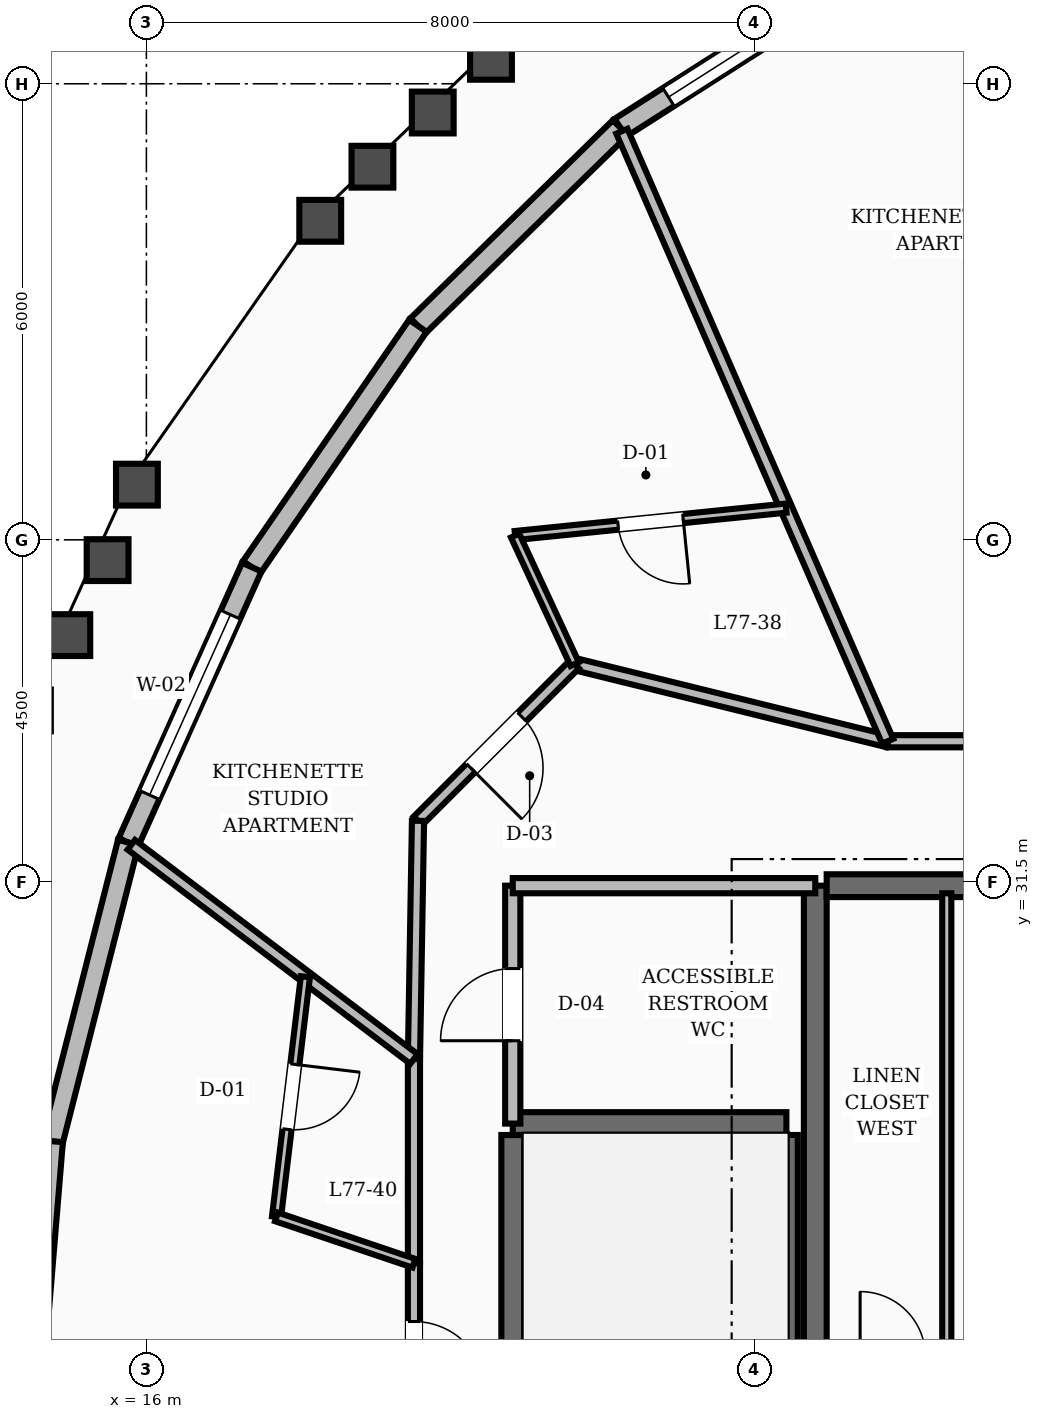
"""IFC4 building model, lengths in metres.
Left out: names, types, materials, properties, quantities, classifications, styles, units other than length and angle.
Written with IfcOpenShell. Run it as: python <this file> out.ifc"""

import sys

from ifc_helpers import new_model, si_unit, direction, frame, frame_2d, origin, place, context, subcontext, project, spatial, rectangle, extrude, element, fill, save


model = new_model("IFC4")
c1 = context("Model", 3, precision=1e-05, world=origin(), true_north=direction((0.0, 1.0)))
c2 = subcontext(c1, "Body", "Model", "MODEL_VIEW")
j1 = project(units=[si_unit("LENGTHUNIT", "METRE"), si_unit("PLANEANGLEUNIT", "RADIAN")], contexts=[c1])
p1 = place(None, origin())
s1 = spatial("IfcSite", under=j1, at=p1, CompositionType="ELEMENT")
p2 = place(p1, origin())
s2 = spatial("IfcBuilding", under=s1, at=p2, CompositionType="ELEMENT")
p3 = place(p2, frame((0.0, 0.0, 294.0)))
s3 = spatial("IfcBuildingStorey", under=s2, at=p3, CompositionType="ELEMENT", Elevation=294.0)
p4 = place(p3, frame((24.8, 25.15, 0.0), z_axis=(0.0, 0.0, 1.0), x_axis=(0.0, 1.0, 0.0)))
e1 = element("IfcWall", 1, at=p4, inside=s3, PredefinedType="SHEAR", context=c2, shape_type="SweptSolid", body=[
    extrude(rectangle(XDim=6.3, YDim=0.3, at=frame_2d((3.15, 0.0))), origin(), (0.0, 0.0, 1.0), 3.6),
])
p5 = place(p3, frame((24.95, 31.45, 0.0), z_axis=(0.0, 0.0, 1.0), x_axis=(1.0, 0.0, 0.0)))
e2 = element("IfcWall", 2, at=p5, inside=s3, PredefinedType="SHEAR", context=c2, shape_type="SweptSolid", body=[
    extrude(rectangle(XDim=3.25, YDim=0.3, at=frame_2d((1.625, 0.0))), origin(), (0.0, 0.0, 1.0), 3.6),
])
for number, where, z_axis, x_axis in (
    (3, (20.82, 19.43, 0.0), (0.0, 0.0, 1.0), (0.0, 1.0, 0.0)),
    (4, (24.42, 19.43, 0.0), (0.0, 0.0, 1.0), (0.0, 1.0, 0.0)),
):
    element("IfcWall", number, at=place(p3, frame(where, z_axis=z_axis, x_axis=x_axis)), inside=s3, PredefinedType="SHEAR", context=c2, shape_type="SweptSolid", body=[
        extrude(rectangle(XDim=8.74, YDim=0.3, at=frame_2d((4.37, 0.0))), origin(), (0.0, 0.0, 1.0), 3.6),
    ])
p6 = place(p3, frame((20.82, 28.32, 0.0), z_axis=(0.0, 0.0, 1.0), x_axis=(1.0, 0.0, 0.0)))
e5 = element("IfcWall", 5, at=p6, inside=s3, PredefinedType="SHEAR", context=c2, shape_type="SweptSolid", body=[
    extrude(rectangle(XDim=3.6, YDim=0.3, at=frame_2d((1.8, 0.0))), origin(), (0.0, 0.0, 1.0), 3.6),
])
p7 = place(p3, frame((25.274, 43.357, 0.0), z_axis=(0.0, 0.0, 1.0), x_axis=(-0.843329306989, -0.537397134319, 0.0)))
e6 = element("IfcWall", 6, at=p7, inside=s3, PredefinedType="STANDARD", context=c2, shape_type="SweptSolid", body=[
    extrude(rectangle(XDim=3.603, YDim=0.28, at=frame_2d((1.802, 0.0))), origin(), (0.0, 0.0, 1.0), 2.82),
])
p8 = place(p7, frame((0.752, 0.0, 0.8)))
e7 = element("IfcOpeningElement", 7, at=p8, cuts=e6, PredefinedType="OPENING", context=c2, shape_type="SweptSolid", body=[
    extrude(rectangle(XDim=2.1, YDim=1.65, at=frame_2d((1.05, 0.825))), frame((0.0, 0.15, 0.0), z_axis=(0.0, -1.0, 0.0), x_axis=(1.0, 0.0, 0.0)), (0.0, 0.0, 1.0), 0.3),
])
p9 = place(p3, frame((22.235, 41.421, 0.0), z_axis=(0.0, 0.0, 1.0), x_axis=(-0.714829041056, -0.699299250724, 0.0)))
e8 = element("IfcWall", 8, at=p9, inside=s3, PredefinedType="STANDARD", context=c2, shape_type="SweptSolid", body=[
    extrude(rectangle(XDim=3.726, YDim=0.28, at=frame_2d((1.863, 0.0))), origin(), (0.0, 0.0, 1.0), 2.82),
])
p10 = place(p3, frame((19.572, 38.815, 0.0), z_axis=(0.0, 0.0, 1.0), x_axis=(-0.567090463347, -0.823655514388, 0.0)))
e9 = element("IfcWall", 9, at=p10, inside=s3, PredefinedType="STANDARD", context=c2, shape_type="SweptSolid", body=[
    extrude(rectangle(XDim=3.855, YDim=0.28, at=frame_2d((1.927, 0.0))), origin(), (0.0, 0.0, 1.0), 2.82),
])
p11 = place(p3, frame((17.386, 35.64, 0.0), z_axis=(0.0, 0.0, 1.0), x_axis=(-0.409103581908, -0.912487950205, 0.0)))
e10 = element("IfcWall", 10, at=p11, inside=s3, PredefinedType="STANDARD", context=c2, shape_type="SweptSolid", body=[
    extrude(rectangle(XDim=3.97, YDim=0.28, at=frame_2d((1.985, 0.0))), origin(), (0.0, 0.0, 1.0), 2.82),
])
p12 = place(p11, frame((0.685, 0.0, 0.8)))
e11 = element("IfcOpeningElement", 11, at=p12, cuts=e10, PredefinedType="OPENING", context=c2, shape_type="SweptSolid", body=[
    extrude(rectangle(XDim=2.6, YDim=1.65, at=frame_2d((1.3, 0.825))), frame((0.0, 0.15, 0.0), z_axis=(0.0, -1.0, 0.0), x_axis=(1.0, 0.0, 0.0)), (0.0, 0.0, 1.0), 0.3),
])
p13 = place(p3, frame((15.762, 32.018, 0.0), z_axis=(0.0, 0.0, 1.0), x_axis=(-0.246626857917, -0.969110516378, 0.0)))
e12 = element("IfcWall", 12, at=p13, inside=s3, PredefinedType="STANDARD", context=c2, shape_type="SweptSolid", body=[
    extrude(rectangle(XDim=4.056, YDim=0.28, at=frame_2d((2.028, 0.0))), origin(), (0.0, 0.0, 1.0), 2.82),
])
p14 = place(p3, frame((14.762, 28.088, 0.0), z_axis=(0.0, 0.0, 1.0), x_axis=(-0.082321320945, -0.996605839898, 0.0)))
e13 = element("IfcWall", 13, at=p14, inside=s3, PredefinedType="STANDARD", context=c2, shape_type="SweptSolid", body=[
    extrude(rectangle(XDim=4.102, YDim=0.28, at=frame_2d((2.051, 0.0))), origin(), (0.0, 0.0, 1.0), 2.82),
])
p15 = place(p3, frame((20.82, 28.32, 0.0), z_axis=(0.0, 0.0, 1.0), x_axis=(0.0, 1.0, 0.0)))
e14 = element("IfcWall", 14, at=p15, inside=s3, PredefinedType="SOLIDWALL", context=c2, shape_type="SweptSolid", body=[
    extrude(rectangle(XDim=3.13, YDim=0.2, at=frame_2d((1.565, 0.0))), origin(), (0.0, 0.0, 1.0), 2.81),
])
p16 = place(p15, frame((1.09, 0.0, 0.0)))
e15 = element("IfcOpeningElement", 15, at=p16, cuts=e14, PredefinedType="OPENING", context=c2, shape_type="SweptSolid", body=[
    extrude(rectangle(XDim=0.95, YDim=2.1, at=frame_2d((0.475, 1.05))), frame((0.0, 0.11, 0.0), z_axis=(0.0, -1.0, 0.0), x_axis=(1.0, 0.0, 0.0)), (0.0, 0.0, 1.0), 0.22),
])
p17 = place(p3, frame((20.82, 31.45, 0.0), z_axis=(0.0, 0.0, 1.0), x_axis=(1.0, 0.0, 0.0)))
e16 = element("IfcWall", 16, at=p17, inside=s3, PredefinedType="SOLIDWALL", context=c2, shape_type="SweptSolid", body=[
    extrude(rectangle(XDim=3.98, YDim=0.2, at=frame_2d((1.99, 0.0))), origin(), (0.0, 0.0, 1.0), 2.81),
])
p18 = place(p3, frame((26.53, 25.25, 0.0), z_axis=(0.0, 0.0, 1.0), x_axis=(0.0, 1.0, 0.0)))
e17 = element("IfcWall", 17, at=p18, inside=s3, PredefinedType="PARTITIONING", context=c2, shape_type="SweptSolid", body=[
    extrude(rectangle(XDim=6.1, YDim=0.12, at=frame_2d((3.05, 0.0))), origin(), (0.0, 0.0, 1.0), 2.81),
])
p19 = place(p3, frame((28.127, 33.35, 0.0), z_axis=(0.0, 0.0, 1.0), x_axis=(-1.0, 0.0, 0.0)))
e18 = element("IfcWall", 18, at=p19, inside=s3, PredefinedType="SOLIDWALL", context=c2, shape_type="SweptSolid", body=[
    extrude(rectangle(XDim=2.375, YDim=0.16, at=frame_2d((1.188, 0.0))), origin(), (0.0, 0.0, 1.0), 2.81),
])
p20 = place(p3, frame((25.752, 33.35, 0.0), z_axis=(0.0, 0.0, 1.0), x_axis=(-0.970939799552, 0.239323850978, 0.0)))
e19 = element("IfcWall", 19, at=p20, inside=s3, PredefinedType="SOLIDWALL", context=c2, shape_type="SweptSolid", body=[
    extrude(rectangle(XDim=4.241, YDim=0.16, at=frame_2d((2.12, 0.0))), origin(), (0.0, 0.0, 1.0), 2.81),
])
p21 = place(p3, frame((21.635, 34.365, 0.0), z_axis=(0.0, 0.0, 1.0), x_axis=(-0.707106781187, -0.707106781187, 0.0)))
e20 = element("IfcWall", 20, at=p21, inside=s3, PredefinedType="SOLIDWALL", context=c2, shape_type="SweptSolid", body=[
    extrude(rectangle(XDim=2.916, YDim=0.16, at=frame_2d((1.458, 0.0))), origin(), (0.0, 0.0, 1.0), 2.81),
])
p22 = place(p21, frame((0.983, 0.0, 0.0)))
e21 = element("IfcOpeningElement", 21, at=p22, cuts=e20, PredefinedType="OPENING", context=c2, shape_type="SweptSolid", body=[
    extrude(rectangle(XDim=0.95, YDim=2.1, at=frame_2d((0.475, 1.05))), frame((0.0, 0.09, 0.0), z_axis=(0.0, -1.0, 0.0), x_axis=(1.0, 0.0, 0.0)), (0.0, 0.0, 1.0), 0.18),
])
p23 = place(p3, frame((19.573, 32.303, 0.0), z_axis=(0.0, 0.0, 1.0), x_axis=(-0.016981035134, -0.999855811828, 0.0)))
e22 = element("IfcWall", 22, at=p23, inside=s3, PredefinedType="SOLIDWALL", context=c2, shape_type="SweptSolid", body=[
    extrude(rectangle(XDim=3.134, YDim=0.16, at=frame_2d((1.567, 0.0))), origin(), (0.0, 0.0, 1.0), 2.81),
])
p24 = place(p3, frame((19.52, 29.169, 0.0), z_axis=(0.0, 0.0, 1.0), x_axis=(0.0, -1.0, 0.0)))
e23 = element("IfcWall", 23, at=p24, inside=s3, PredefinedType="SOLIDWALL", context=c2, shape_type="SweptSolid", body=[
    extrude(rectangle(XDim=2.687, YDim=0.16, at=frame_2d((1.344, 0.0))), origin(), (0.0, 0.0, 1.0), 2.81),
])
p25 = place(p3, frame((19.52, 26.482, 0.0), z_axis=(0.0, 0.0, 1.0), x_axis=(0.0, -1.0, 0.0)))
e24 = element("IfcWall", 24, at=p25, inside=s3, PredefinedType="SOLIDWALL", context=c2, shape_type="SweptSolid", body=[
    extrude(rectangle(XDim=2.482, YDim=0.16, at=frame_2d((1.241, 0.0))), origin(), (0.0, 0.0, 1.0), 2.81),
])
p26 = place(p25, frame((0.766, 0.0, 0.0)))
e25 = element("IfcOpeningElement", 25, at=p26, cuts=e24, PredefinedType="OPENING", context=c2, shape_type="SweptSolid", body=[
    extrude(rectangle(XDim=0.95, YDim=2.1, at=frame_2d((0.475, 1.05))), frame((0.0, 0.09, 0.0), z_axis=(0.0, -1.0, 0.0), x_axis=(1.0, 0.0, 0.0)), (0.0, 0.0, 1.0), 0.18),
])
p27 = place(p3, frame((25.752, 33.35, 0.0), z_axis=(0.0, 0.0, 1.0), x_axis=(-0.399482659975, 0.91674075091, 0.0)))
e26 = element("IfcWall", 26, at=p27, inside=s3, PredefinedType="SOLIDWALL", context=c2, shape_type="SweptSolid", body=[
    extrude(rectangle(XDim=8.754, YDim=0.16, at=frame_2d((4.377, 0.0))), origin(), (0.0, 0.0, 1.0), 2.81),
])
p28 = place(p3, frame((24.416, 36.417, 0.0), z_axis=(0.0, 0.0, 1.0), x_axis=(-0.994916385041, -0.100704452615, 0.0)))
e27 = element("IfcWall", 27, at=p28, inside=s3, PredefinedType="PARTITIONING", context=c2, shape_type="SweptSolid", body=[
    extrude(rectangle(XDim=3.583, YDim=0.12, at=frame_2d((1.792, 0.0))), origin(), (0.0, 0.0, 1.0), 2.81),
])
p29 = place(p28, frame((1.362, 0.0, 0.0)))
e28 = element("IfcOpeningElement", 28, at=p29, cuts=e27, PredefinedType="OPENING", context=c2, shape_type="SweptSolid", body=[
    extrude(rectangle(XDim=0.86, YDim=2.1, at=frame_2d((0.43, 1.05))), frame((0.0, 0.07, 0.0), z_axis=(0.0, -1.0, 0.0), x_axis=(1.0, 0.0, 0.0)), (0.0, 0.0, 1.0), 0.14),
])
p30 = place(p3, frame((21.635, 34.365, 0.0), z_axis=(0.0, 0.0, 1.0), x_axis=(-0.42056094126, 0.907264291531, 0.0)))
e29 = element("IfcWall", 29, at=p30, inside=s3, PredefinedType="PARTITIONING", context=c2, shape_type="SweptSolid", body=[
    extrude(rectangle(XDim=1.864, YDim=0.12, at=frame_2d((0.932, 0.0))), origin(), (0.0, 0.0, 1.0), 2.81),
])
p31 = place(p3, frame((19.52, 29.169, 0.0), z_axis=(0.0, 0.0, 1.0), x_axis=(-0.796937950296, 0.604061175195, 0.0)))
e30 = element("IfcWall", 30, at=p31, inside=s3, PredefinedType="SOLIDWALL", context=c2, shape_type="SweptSolid", body=[
    extrude(rectangle(XDim=4.666, YDim=0.16, at=frame_2d((2.333, 0.0))), origin(), (0.0, 0.0, 1.0), 2.81),
])
p32 = place(p3, frame((18.092, 30.252, 0.0), z_axis=(0.0, 0.0, 1.0), x_axis=(-0.119369071505, -0.992849950782, 0.0)))
e31 = element("IfcWall", 31, at=p32, inside=s3, PredefinedType="PARTITIONING", context=c2, shape_type="SweptSolid", body=[
    extrude(rectangle(XDim=3.182, YDim=0.12, at=frame_2d((1.591, 0.0))), origin(), (0.0, 0.0, 1.0), 2.81),
])
p33 = place(p32, frame((1.161, 0.0, 0.0)))
e32 = element("IfcOpeningElement", 32, at=p33, cuts=e31, PredefinedType="OPENING", context=c2, shape_type="SweptSolid", body=[
    extrude(rectangle(XDim=0.86, YDim=2.1, at=frame_2d((0.43, 1.05))), frame((0.0, 0.07, 0.0), z_axis=(0.0, -1.0, 0.0), x_axis=(1.0, 0.0, 0.0)), (0.0, 0.0, 1.0), 0.14),
])
p34 = place(p3, frame((19.52, 26.482, 0.0), z_axis=(0.0, 0.0, 1.0), x_axis=(-0.947551380021, 0.319603476545, 0.0)))
e33 = element("IfcWall", 33, at=p34, inside=s3, PredefinedType="PARTITIONING", context=c2, shape_type="SweptSolid", body=[
    extrude(rectangle(XDim=1.908, YDim=0.12, at=frame_2d((0.954, 0.0))), origin(), (0.0, 0.0, 1.0), 2.81),
])
p35 = place(p8, origin())
e34 = element("IfcWindow", 34, at=p35, inside=s3, PartitioningType="SINGLE_PANEL", PredefinedType="WINDOW", context=c2, shape_type="SweptSolid", body=[
    extrude(rectangle(XDim=2.1, YDim=1.65, at=frame_2d((1.05, 0.825))), frame((0.0, 0.03, 0.0), z_axis=(0.0, -1.0, 0.0), x_axis=(1.0, 0.0, 0.0)), (0.0, 0.0, 1.0), 0.06),
])
fill(e7, e34)
p36 = place(p12, origin())
e35 = element("IfcWindow", 35, at=p36, inside=s3, PartitioningType="SINGLE_PANEL", PredefinedType="WINDOW", context=c2, shape_type="SweptSolid", body=[
    extrude(rectangle(XDim=2.6, YDim=1.65, at=frame_2d((1.3, 0.825))), frame((0.0, 0.03, 0.0), z_axis=(0.0, -1.0, 0.0), x_axis=(1.0, 0.0, 0.0)), (0.0, 0.0, 1.0), 0.06),
])
fill(e11, e35)
p37 = place(p16, origin())
e36 = element("IfcDoor", 36, at=p37, inside=s3, OperationType="SINGLE_SWING_LEFT", PredefinedType="DOOR", context=c2, shape_type="SweptSolid", body=[
    extrude(rectangle(XDim=0.95, YDim=2.1, at=frame_2d((0.475, 1.05))), frame((0.0, 0.025, 0.0), z_axis=(0.0, -1.0, 0.0), x_axis=(1.0, 0.0, 0.0)), (0.0, 0.0, 1.0), 0.05),
])
fill(e15, e36)
p38 = place(p29, origin())
e37 = element("IfcDoor", 37, at=p38, inside=s3, OperationType="SINGLE_SWING_LEFT", PredefinedType="DOOR", context=c2, shape_type="SweptSolid", body=[
    extrude(rectangle(XDim=0.86, YDim=2.1, at=frame_2d((0.43, 1.05))), frame((0.0, 0.025, 0.0), z_axis=(0.0, -1.0, 0.0), x_axis=(1.0, 0.0, 0.0)), (0.0, 0.0, 1.0), 0.05),
])
fill(e28, e37)
p39 = place(p22, origin())
e38 = element("IfcDoor", 38, at=p39, inside=s3, OperationType="SINGLE_SWING_RIGHT", PredefinedType="DOOR", context=c2, shape_type="SweptSolid", body=[
    extrude(rectangle(XDim=0.95, YDim=2.1, at=frame_2d((0.475, 1.05))), frame((0.0, 0.025, 0.0), z_axis=(0.0, -1.0, 0.0), x_axis=(1.0, 0.0, 0.0)), (0.0, 0.0, 1.0), 0.05),
])
fill(e21, e38)
p40 = place(p33, origin())
e39 = element("IfcDoor", 39, at=p40, inside=s3, OperationType="SINGLE_SWING_LEFT", PredefinedType="DOOR", context=c2, shape_type="SweptSolid", body=[
    extrude(rectangle(XDim=0.86, YDim=2.1, at=frame_2d((0.43, 1.05))), frame((0.0, 0.025, 0.0), z_axis=(0.0, -1.0, 0.0), x_axis=(1.0, 0.0, 0.0)), (0.0, 0.0, 1.0), 0.05),
])
fill(e32, e39)
p41 = place(p26, origin())
e40 = element("IfcDoor", 40, at=p41, inside=s3, OperationType="SINGLE_SWING_RIGHT", PredefinedType="DOOR", context=c2, shape_type="SweptSolid", body=[
    extrude(rectangle(XDim=0.95, YDim=2.1, at=frame_2d((0.475, 1.05))), frame((0.0, 0.025, 0.0), z_axis=(0.0, -1.0, 0.0), x_axis=(1.0, 0.0, 0.0)), (0.0, 0.0, 1.0), 0.05),
])
fill(e25, e40)
save(model, sys.argv[1])
